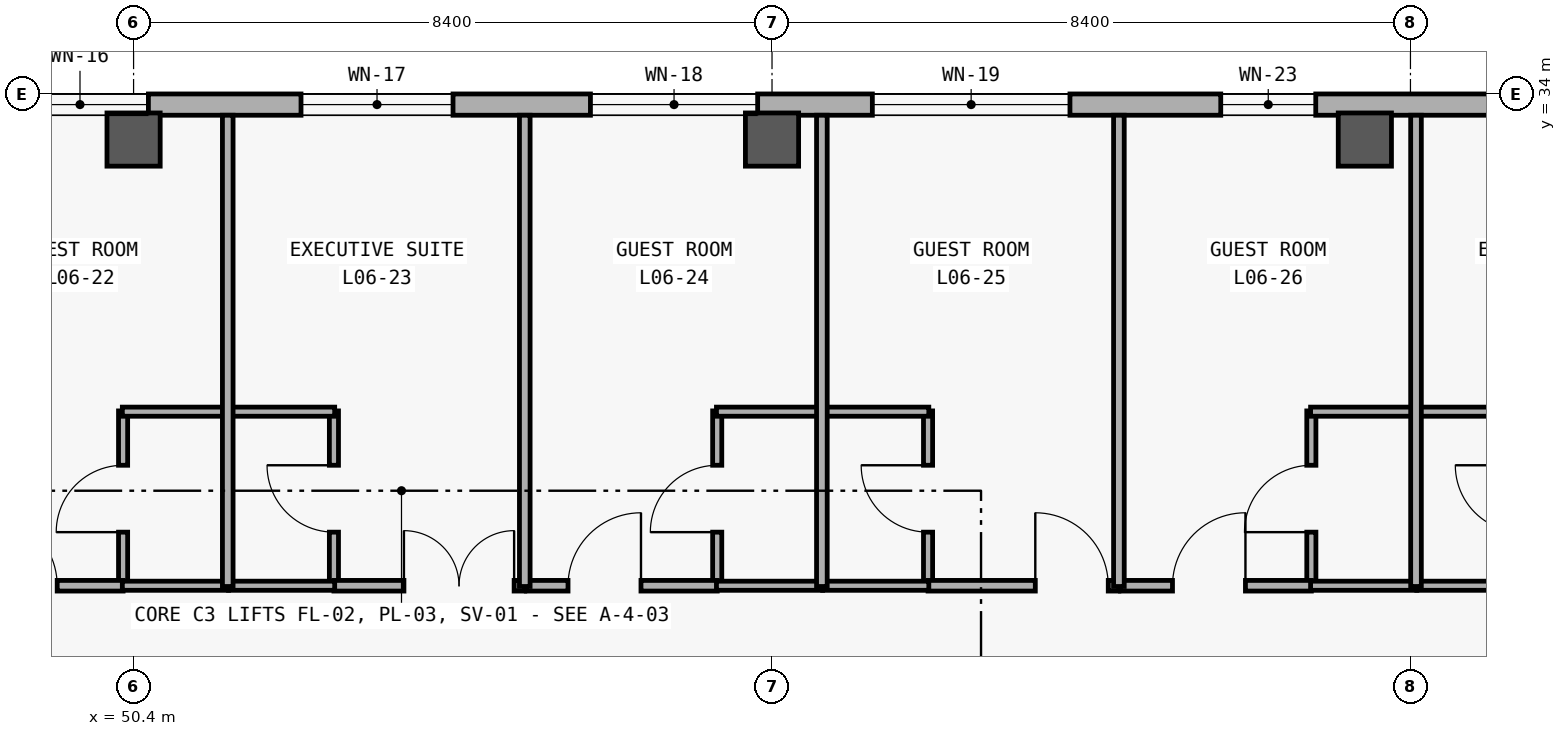
"""IFC4 building model, lengths in metres.
Left out: names, types, materials, properties, quantities, classifications, styles, units other than length and angle.
Written with IfcOpenShell. Run it as: python <this file> out.ifc"""

import sys

from ifc_helpers import new_model, si_unit, direction, frame, frame_2d, origin, origin_2d, place, context, subcontext, project, spatial, rectangle, extrude, element, fill, save


model = new_model("IFC4")
c1 = context("Model", 3, precision=1e-05, world=origin(), true_north=direction((0.0, 1.0)))
c2 = subcontext(c1, "Body", "Model", "MODEL_VIEW")
j1 = project(units=[si_unit("LENGTHUNIT", "METRE"), si_unit("PLANEANGLEUNIT", "RADIAN")], contexts=[c1])
p1 = place(None, origin())
s1 = spatial("IfcSite", under=j1, at=p1, CompositionType="ELEMENT")
p2 = place(p1, origin())
s2 = spatial("IfcBuilding", under=s1, at=p2, CompositionType="ELEMENT")
p3 = place(p2, frame((0.0, 0.0, 26.4)))
s3 = spatial("IfcBuildingStorey", under=s2, at=p3, CompositionType="ELEMENT", Elevation=26.4)
for number, where, z_axis, x_axis in (
    (1, (50.4, 33.4, 0.0), (0.0, 0.0, 1.0), (1.0, 0.0, 0.0)),
    (2, (58.8, 33.4, 0.0), (0.0, 0.0, 1.0), (1.0, 0.0, 0.0)),
    (3, (66.6, 33.4, 0.0), (0.0, 0.0, 1.0), (1.0, 0.0, 0.0)),
):
    element("IfcColumn", number, at=place(p3, frame(where, z_axis=z_axis, x_axis=x_axis)), inside=s3, PredefinedType="COLUMN", context=c2, shape_type="SweptSolid", body=[
        extrude(rectangle(XDim=0.7, YDim=0.7, at=origin_2d()), origin(), (0.0, 0.0, 1.0), 3.6),
    ])
p4 = place(p3, frame((8.68, 33.86, 0.0), z_axis=(0.0, 0.0, 1.0), x_axis=(1.0, 0.0, 0.0)))
e4 = element("IfcWall", 4, at=p4, inside=s3, PredefinedType="SOLIDWALL", context=c2, shape_type="SweptSolid", body=[
    extrude(rectangle(XDim=66.64, YDim=0.28, at=frame_2d((33.32, 0.0))), origin(), (0.0, 0.0, 1.0), 3.32),
])
p5 = place(p4, frame((4.68, 0.0, 0.85)))
e5 = element("IfcOpeningElement", 5, at=p5, cuts=e4, PredefinedType="OPENING", context=c2, shape_type="SweptSolid", body=[
    extrude(rectangle(XDim=2.48, YDim=2.0, at=frame_2d((1.24, 1.0))), frame((0.0, 0.15, 0.0), z_axis=(0.0, -1.0, 0.0), x_axis=(1.0, 0.0, 0.0)), (0.0, 0.0, 1.0), 0.3),
])
p6 = place(p4, frame((12.829, 0.0, 0.85)))
e6 = element("IfcOpeningElement", 6, at=p6, cuts=e4, PredefinedType="OPENING", context=c2, shape_type="SweptSolid", body=[
    extrude(rectangle(XDim=1.65, YDim=1.75, at=frame_2d((0.825, 0.875))), frame((0.0, 0.15, 0.0), z_axis=(0.0, -1.0, 0.0), x_axis=(1.0, 0.0, 0.0)), (0.0, 0.0, 1.0), 0.3),
])
p7 = place(p4, frame((16.588, 0.0, 0.85)))
e7 = element("IfcOpeningElement", 7, at=p7, cuts=e4, PredefinedType="OPENING", context=c2, shape_type="SweptSolid", body=[
    extrude(rectangle(XDim=1.95, YDim=1.75, at=frame_2d((0.975, 0.875))), frame((0.0, 0.15, 0.0), z_axis=(0.0, -1.0, 0.0), x_axis=(1.0, 0.0, 0.0)), (0.0, 0.0, 1.0), 0.3),
])
p8 = place(p4, frame((20.347, 0.0, 0.85)))
e8 = element("IfcOpeningElement", 8, at=p8, cuts=e4, PredefinedType="OPENING", context=c2, shape_type="SweptSolid", body=[
    extrude(rectangle(XDim=2.25, YDim=1.75, at=frame_2d((1.125, 0.875))), frame((0.0, 0.15, 0.0), z_axis=(0.0, -1.0, 0.0), x_axis=(1.0, 0.0, 0.0)), (0.0, 0.0, 1.0), 0.3),
])
p9 = place(p4, frame((24.105, 0.0, 0.85)))
e9 = element("IfcOpeningElement", 9, at=p9, cuts=e4, PredefinedType="OPENING", context=c2, shape_type="SweptSolid", body=[
    extrude(rectangle(XDim=2.55, YDim=1.8, at=frame_2d((1.275, 0.9))), frame((0.0, 0.15, 0.0), z_axis=(0.0, -1.0, 0.0), x_axis=(1.0, 0.0, 0.0)), (0.0, 0.0, 1.0), 0.3),
])
p10 = place(p4, frame((27.864, 0.0, 0.85)))
e10 = element("IfcOpeningElement", 10, at=p10, cuts=e4, PredefinedType="OPENING", context=c2, shape_type="SweptSolid", body=[
    extrude(rectangle(XDim=2.85, YDim=1.85, at=frame_2d((1.425, 0.925))), frame((0.0, 0.15, 0.0), z_axis=(0.0, -1.0, 0.0), x_axis=(1.0, 0.0, 0.0)), (0.0, 0.0, 1.0), 0.3),
])
p11 = place(p4, frame((32.497, 0.0, 0.85)))
e11 = element("IfcOpeningElement", 11, at=p11, cuts=e4, PredefinedType="OPENING", context=c2, shape_type="SweptSolid", body=[
    extrude(rectangle(XDim=1.4, YDim=1.6, at=frame_2d((0.7, 0.8))), frame((0.0, 0.15, 0.0), z_axis=(0.0, -1.0, 0.0), x_axis=(1.0, 0.0, 0.0)), (0.0, 0.0, 1.0), 0.3),
])
p12 = place(p4, frame((36.306, 0.0, 0.85)))
e12 = element("IfcOpeningElement", 12, at=p12, cuts=e4, PredefinedType="OPENING", context=c2, shape_type="SweptSolid", body=[
    extrude(rectangle(XDim=1.6, YDim=1.6, at=frame_2d((0.8, 0.8))), frame((0.0, 0.15, 0.0), z_axis=(0.0, -1.0, 0.0), x_axis=(1.0, 0.0, 0.0)), (0.0, 0.0, 1.0), 0.3),
])
p13 = place(p4, frame((40.115, 0.0, 0.85)))
e13 = element("IfcOpeningElement", 13, at=p13, cuts=e4, PredefinedType="OPENING", context=c2, shape_type="SweptSolid", body=[
    extrude(rectangle(XDim=1.8, YDim=1.6, at=frame_2d((0.9, 0.8))), frame((0.0, 0.15, 0.0), z_axis=(0.0, -1.0, 0.0), x_axis=(1.0, 0.0, 0.0)), (0.0, 0.0, 1.0), 0.3),
])
p14 = place(p4, frame((43.923, 0.0, 0.85)))
e14 = element("IfcOpeningElement", 14, at=p14, cuts=e4, PredefinedType="OPENING", context=c2, shape_type="SweptSolid", body=[
    extrude(rectangle(XDim=2.0, YDim=1.65, at=frame_2d((1.0, 0.825))), frame((0.0, 0.15, 0.0), z_axis=(0.0, -1.0, 0.0), x_axis=(1.0, 0.0, 0.0)), (0.0, 0.0, 1.0), 0.3),
])
p15 = place(p4, frame((47.731, 0.0, 0.85)))
e15 = element("IfcOpeningElement", 15, at=p15, cuts=e4, PredefinedType="OPENING", context=c2, shape_type="SweptSolid", body=[
    extrude(rectangle(XDim=2.2, YDim=1.65, at=frame_2d((1.1, 0.825))), frame((0.0, 0.15, 0.0), z_axis=(0.0, -1.0, 0.0), x_axis=(1.0, 0.0, 0.0)), (0.0, 0.0, 1.0), 0.3),
])
p16 = place(p4, frame((51.44, 0.0, 0.85)))
e16 = element("IfcOpeningElement", 16, at=p16, cuts=e4, PredefinedType="OPENING", context=c2, shape_type="SweptSolid", body=[
    extrude(rectangle(XDim=2.6, YDim=2.2, at=frame_2d((1.3, 1.1))), frame((0.0, 0.15, 0.0), z_axis=(0.0, -1.0, 0.0), x_axis=(1.0, 0.0, 0.0)), (0.0, 0.0, 1.0), 0.3),
])
p17 = place(p4, frame((56.024, 0.0, 0.85)))
e17 = element("IfcOpeningElement", 17, at=p17, cuts=e4, PredefinedType="OPENING", context=c2, shape_type="SweptSolid", body=[
    extrude(rectangle(XDim=1.25, YDim=1.45, at=frame_2d((0.625, 0.725))), frame((0.0, 0.15, 0.0), z_axis=(0.0, -1.0, 0.0), x_axis=(1.0, 0.0, 0.0)), (0.0, 0.0, 1.0), 0.3),
])
p18 = place(p4, frame((59.882, 0.0, 0.85)))
e18 = element("IfcOpeningElement", 18, at=p18, cuts=e4, PredefinedType="OPENING", context=c2, shape_type="SweptSolid", body=[
    extrude(rectangle(XDim=1.35, YDim=1.55, at=frame_2d((0.675, 0.775))), frame((0.0, 0.15, 0.0), z_axis=(0.0, -1.0, 0.0), x_axis=(1.0, 0.0, 0.0)), (0.0, 0.0, 1.0), 0.3),
])
p19 = place(p4, frame((63.74, 0.0, 0.85)))
e19 = element("IfcOpeningElement", 19, at=p19, cuts=e4, PredefinedType="OPENING", context=c2, shape_type="SweptSolid", body=[
    extrude(rectangle(XDim=1.45, YDim=1.65, at=frame_2d((0.725, 0.825))), frame((0.0, 0.15, 0.0), z_axis=(0.0, -1.0, 0.0), x_axis=(1.0, 0.0, 0.0)), (0.0, 0.0, 1.0), 0.3),
])
p20 = place(p3, frame((50.262, 27.52, 0.0), z_axis=(0.0, 0.0, 1.0), x_axis=(0.0, 1.0, 0.0)))
e20 = element("IfcWall", 20, at=p20, inside=s3, PredefinedType="PARTITIONING", context=c2, shape_type="SweptSolid", body=[
    extrude(rectangle(XDim=2.31, YDim=0.12, at=frame_2d((1.155, 0.0))), origin(), (0.0, 0.0, 1.0), 2.48),
])
p21 = place(p20, frame((0.715, 0.0, 0.0)))
e21 = element("IfcOpeningElement", 21, at=p21, cuts=e20, PredefinedType="OPENING", context=c2, shape_type="SweptSolid", body=[
    extrude(rectangle(XDim=0.88, YDim=2.15, at=frame_2d((0.44, 1.075))), frame((0.0, 0.07, 0.0), z_axis=(0.0, -1.0, 0.0), x_axis=(1.0, 0.0, 0.0)), (0.0, 0.0, 1.0), 0.14),
])
p22 = place(p3, frame((53.036, 27.52, 0.0), z_axis=(0.0, 0.0, 1.0), x_axis=(0.0, 1.0, 0.0)))
e22 = element("IfcWall", 22, at=p22, inside=s3, PredefinedType="PARTITIONING", context=c2, shape_type="SweptSolid", body=[
    extrude(rectangle(XDim=2.31, YDim=0.12, at=frame_2d((1.155, 0.0))), origin(), (0.0, 0.0, 1.0), 2.48),
])
p23 = place(p22, frame((0.715, 0.0, 0.0)))
e23 = element("IfcOpeningElement", 23, at=p23, cuts=e22, PredefinedType="OPENING", context=c2, shape_type="SweptSolid", body=[
    extrude(rectangle(XDim=0.88, YDim=2.15, at=frame_2d((0.44, 1.075))), frame((0.0, 0.07, 0.0), z_axis=(0.0, -1.0, 0.0), x_axis=(1.0, 0.0, 0.0)), (0.0, 0.0, 1.0), 0.14),
])
p24 = place(p3, frame((58.079, 27.52, 0.0), z_axis=(0.0, 0.0, 1.0), x_axis=(0.0, 1.0, 0.0)))
e24 = element("IfcWall", 24, at=p24, inside=s3, PredefinedType="PARTITIONING", context=c2, shape_type="SweptSolid", body=[
    extrude(rectangle(XDim=2.31, YDim=0.12, at=frame_2d((1.155, 0.0))), origin(), (0.0, 0.0, 1.0), 2.48),
])
p25 = place(p24, frame((0.715, 0.0, 0.0)))
e25 = element("IfcOpeningElement", 25, at=p25, cuts=e24, PredefinedType="OPENING", context=c2, shape_type="SweptSolid", body=[
    extrude(rectangle(XDim=0.88, YDim=2.15, at=frame_2d((0.44, 1.075))), frame((0.0, 0.07, 0.0), z_axis=(0.0, -1.0, 0.0), x_axis=(1.0, 0.0, 0.0)), (0.0, 0.0, 1.0), 0.14),
])
p26 = place(p3, frame((60.853, 27.52, 0.0), z_axis=(0.0, 0.0, 1.0), x_axis=(0.0, 1.0, 0.0)))
e26 = element("IfcWall", 26, at=p26, inside=s3, PredefinedType="PARTITIONING", context=c2, shape_type="SweptSolid", body=[
    extrude(rectangle(XDim=2.31, YDim=0.12, at=frame_2d((1.155, 0.0))), origin(), (0.0, 0.0, 1.0), 2.48),
])
p27 = place(p26, frame((0.715, 0.0, 0.0)))
e27 = element("IfcOpeningElement", 27, at=p27, cuts=e26, PredefinedType="OPENING", context=c2, shape_type="SweptSolid", body=[
    extrude(rectangle(XDim=0.88, YDim=2.15, at=frame_2d((0.44, 1.075))), frame((0.0, 0.07, 0.0), z_axis=(0.0, -1.0, 0.0), x_axis=(1.0, 0.0, 0.0)), (0.0, 0.0, 1.0), 0.14),
])
p28 = place(p3, frame((65.896, 27.52, 0.0), z_axis=(0.0, 0.0, 1.0), x_axis=(0.0, 1.0, 0.0)))
e28 = element("IfcWall", 28, at=p28, inside=s3, PredefinedType="PARTITIONING", context=c2, shape_type="SweptSolid", body=[
    extrude(rectangle(XDim=2.31, YDim=0.12, at=frame_2d((1.155, 0.0))), origin(), (0.0, 0.0, 1.0), 2.48),
])
p29 = place(p28, frame((0.715, 0.0, 0.0)))
e29 = element("IfcOpeningElement", 29, at=p29, cuts=e28, PredefinedType="OPENING", context=c2, shape_type="SweptSolid", body=[
    extrude(rectangle(XDim=0.88, YDim=2.15, at=frame_2d((0.44, 1.075))), frame((0.0, 0.07, 0.0), z_axis=(0.0, -1.0, 0.0), x_axis=(1.0, 0.0, 0.0)), (0.0, 0.0, 1.0), 0.14),
])
p30 = place(p3, frame((47.75, 27.53, 0.0), z_axis=(0.0, 0.0, 1.0), x_axis=(1.0, 0.0, 0.0)))
e30 = element("IfcWall", 30, at=p30, inside=s3, PredefinedType="PARTITIONING", context=c2, shape_type="SweptSolid", body=[
    extrude(rectangle(XDim=2.512, YDim=0.14, at=frame_2d((1.256, 0.0))), origin(), (0.0, 0.0, 1.0), 2.48),
])
p31 = place(p30, frame((0.685, 0.0, 0.0)))
e31 = element("IfcOpeningElement", 31, at=p31, cuts=e30, PredefinedType="OPENING", context=c2, shape_type="SweptSolid", body=[
    extrude(rectangle(XDim=0.96, YDim=2.25, at=frame_2d((0.48, 1.125))), frame((0.0, 0.08, 0.0), z_axis=(0.0, -1.0, 0.0), x_axis=(1.0, 0.0, 0.0)), (0.0, 0.0, 1.0), 0.16),
])
p32 = place(p3, frame((53.036, 27.53, 0.0), z_axis=(0.0, 0.0, 1.0), x_axis=(1.0, 0.0, 0.0)))
e32 = element("IfcWall", 32, at=p32, inside=s3, PredefinedType="PARTITIONING", context=c2, shape_type="SweptSolid", body=[
    extrude(rectangle(XDim=2.511, YDim=0.14, at=frame_2d((1.256, 0.0))), origin(), (0.0, 0.0, 1.0), 2.48),
])
p33 = place(p32, frame((0.921, 0.0, 0.0)))
e33 = element("IfcOpeningElement", 33, at=p33, cuts=e32, PredefinedType="OPENING", context=c2, shape_type="SweptSolid", body=[
    extrude(rectangle(XDim=1.45, YDim=2.3, at=frame_2d((0.725, 1.15))), frame((0.0, 0.08, 0.0), z_axis=(0.0, -1.0, 0.0), x_axis=(1.0, 0.0, 0.0)), (0.0, 0.0, 1.0), 0.16),
])
p34 = place(p3, frame((55.567, 27.53, 0.0), z_axis=(0.0, 0.0, 1.0), x_axis=(1.0, 0.0, 0.0)))
e34 = element("IfcWall", 34, at=p34, inside=s3, PredefinedType="PARTITIONING", context=c2, shape_type="SweptSolid", body=[
    extrude(rectangle(XDim=2.512, YDim=0.14, at=frame_2d((1.256, 0.0))), origin(), (0.0, 0.0, 1.0), 2.48),
])
p35 = place(p34, frame((0.549, 0.0, 0.0)))
e35 = element("IfcOpeningElement", 35, at=p35, cuts=e34, PredefinedType="OPENING", context=c2, shape_type="SweptSolid", body=[
    extrude(rectangle(XDim=0.96, YDim=2.25, at=frame_2d((0.48, 1.125))), frame((0.0, 0.08, 0.0), z_axis=(0.0, -1.0, 0.0), x_axis=(1.0, 0.0, 0.0)), (0.0, 0.0, 1.0), 0.16),
])
p36 = place(p3, frame((60.853, 27.53, 0.0), z_axis=(0.0, 0.0, 1.0), x_axis=(1.0, 0.0, 0.0)))
e36 = element("IfcWall", 36, at=p36, inside=s3, PredefinedType="PARTITIONING", context=c2, shape_type="SweptSolid", body=[
    extrude(rectangle(XDim=2.511, YDim=0.14, at=frame_2d((1.255, 0.0))), origin(), (0.0, 0.0, 1.0), 2.48),
])
p37 = place(p36, frame((1.411, 0.0, 0.0)))
e37 = element("IfcOpeningElement", 37, at=p37, cuts=e36, PredefinedType="OPENING", context=c2, shape_type="SweptSolid", body=[
    extrude(rectangle(XDim=0.96, YDim=2.25, at=frame_2d((0.48, 1.125))), frame((0.0, 0.08, 0.0), z_axis=(0.0, -1.0, 0.0), x_axis=(1.0, 0.0, 0.0)), (0.0, 0.0, 1.0), 0.16),
])
p38 = place(p3, frame((63.384, 27.53, 0.0), z_axis=(0.0, 0.0, 1.0), x_axis=(1.0, 0.0, 0.0)))
e38 = element("IfcWall", 38, at=p38, inside=s3, PredefinedType="PARTITIONING", context=c2, shape_type="SweptSolid", body=[
    extrude(rectangle(XDim=2.512, YDim=0.14, at=frame_2d((1.256, 0.0))), origin(), (0.0, 0.0, 1.0), 2.48),
])
p39 = place(p38, frame((0.685, 0.0, 0.0)))
e39 = element("IfcOpeningElement", 39, at=p39, cuts=e38, PredefinedType="OPENING", context=c2, shape_type="SweptSolid", body=[
    extrude(rectangle(XDim=0.96, YDim=2.25, at=frame_2d((0.48, 1.125))), frame((0.0, 0.08, 0.0), z_axis=(0.0, -1.0, 0.0), x_axis=(1.0, 0.0, 0.0)), (0.0, 0.0, 1.0), 0.16),
])
for number, where, z_axis, x_axis in (
    (40, (50.252, 27.53, 0.0), (0.0, 0.0, 1.0), (1.0, 0.0, 0.0)),
    (41, (50.252, 29.82, 0.0), (0.0, 0.0, 1.0), (1.0, 0.0, 0.0)),
    (42, (51.649, 27.53, 0.0), (0.0, 0.0, 1.0), (1.0, 0.0, 0.0)),
    (43, (51.649, 29.82, 0.0), (0.0, 0.0, 1.0), (1.0, 0.0, 0.0)),
    (44, (58.069, 27.53, 0.0), (0.0, 0.0, 1.0), (1.0, 0.0, 0.0)),
    (45, (58.069, 29.82, 0.0), (0.0, 0.0, 1.0), (1.0, 0.0, 0.0)),
    (46, (59.466, 27.53, 0.0), (0.0, 0.0, 1.0), (1.0, 0.0, 0.0)),
    (47, (59.466, 29.82, 0.0), (0.0, 0.0, 1.0), (1.0, 0.0, 0.0)),
    (48, (65.886, 27.53, 0.0), (0.0, 0.0, 1.0), (1.0, 0.0, 0.0)),
    (49, (65.886, 29.82, 0.0), (0.0, 0.0, 1.0), (1.0, 0.0, 0.0)),
    (50, (67.283, 27.53, 0.0), (0.0, 0.0, 1.0), (1.0, 0.0, 0.0)),
    (51, (67.283, 29.82, 0.0), (0.0, 0.0, 1.0), (1.0, 0.0, 0.0)),
):
    element("IfcWall", number, at=place(p3, frame(where, z_axis=z_axis, x_axis=x_axis)), inside=s3, PredefinedType="PARTITIONING", context=c2, shape_type="SweptSolid", body=[
        extrude(rectangle(XDim=1.397, YDim=0.12, at=frame_2d((0.698, 0.0))), origin(), (0.0, 0.0, 1.0), 2.48),
    ])
for number, where, z_axis, x_axis in (
    (52, (51.639, 27.52, 0.0), (0.0, 0.0, 1.0), (0.0, 1.0, 0.0)),
    (53, (55.547, 27.52, 0.0), (0.0, 0.0, 1.0), (0.0, 1.0, 0.0)),
    (54, (59.456, 27.52, 0.0), (0.0, 0.0, 1.0), (0.0, 1.0, 0.0)),
    (55, (63.364, 27.52, 0.0), (0.0, 0.0, 1.0), (0.0, 1.0, 0.0)),
    (56, (67.273, 27.52, 0.0), (0.0, 0.0, 1.0), (0.0, 1.0, 0.0)),
):
    element("IfcWall", number, at=place(p3, frame(where, z_axis=z_axis, x_axis=x_axis)), inside=s3, PredefinedType="PARTITIONING", context=c2, shape_type="SweptSolid", body=[
        extrude(rectangle(XDim=6.2, YDim=0.14, at=frame_2d((3.1, 0.0))), origin(), (0.0, 0.0, 1.0), 2.48),
    ])
p40 = place(p13, origin())
e57 = element("IfcWindow", 57, at=p40, inside=s3, PartitioningType="SINGLE_PANEL", PredefinedType="WINDOW", context=c2, shape_type="SweptSolid", body=[
    extrude(rectangle(XDim=1.8, YDim=1.6, at=frame_2d((0.9, 0.8))), frame((0.0, 0.03, 0.0), z_axis=(0.0, -1.0, 0.0), x_axis=(1.0, 0.0, 0.0)), (0.0, 0.0, 1.0), 0.06),
])
fill(e13, e57)
p41 = place(p14, origin())
e58 = element("IfcWindow", 58, at=p41, inside=s3, PartitioningType="SINGLE_PANEL", PredefinedType="WINDOW", context=c2, shape_type="SweptSolid", body=[
    extrude(rectangle(XDim=2.0, YDim=1.65, at=frame_2d((1.0, 0.825))), frame((0.0, 0.03, 0.0), z_axis=(0.0, -1.0, 0.0), x_axis=(1.0, 0.0, 0.0)), (0.0, 0.0, 1.0), 0.06),
])
fill(e14, e58)
p42 = place(p15, origin())
e59 = element("IfcWindow", 59, at=p42, inside=s3, PartitioningType="SINGLE_PANEL", PredefinedType="WINDOW", context=c2, shape_type="SweptSolid", body=[
    extrude(rectangle(XDim=2.2, YDim=1.65, at=frame_2d((1.1, 0.825))), frame((0.0, 0.03, 0.0), z_axis=(0.0, -1.0, 0.0), x_axis=(1.0, 0.0, 0.0)), (0.0, 0.0, 1.0), 0.06),
])
fill(e15, e59)
p43 = place(p16, origin())
e60 = element("IfcWindow", 60, at=p43, inside=s3, PartitioningType="SINGLE_PANEL", PredefinedType="WINDOW", context=c2, shape_type="SweptSolid", body=[
    extrude(rectangle(XDim=2.6, YDim=2.2, at=frame_2d((1.3, 1.1))), frame((0.0, 0.03, 0.0), z_axis=(0.0, -1.0, 0.0), x_axis=(1.0, 0.0, 0.0)), (0.0, 0.0, 1.0), 0.06),
])
fill(e16, e60)
p44 = place(p17, origin())
e61 = element("IfcWindow", 61, at=p44, inside=s3, PartitioningType="SINGLE_PANEL", PredefinedType="WINDOW", context=c2, shape_type="SweptSolid", body=[
    extrude(rectangle(XDim=1.25, YDim=1.45, at=frame_2d((0.625, 0.725))), frame((0.0, 0.03, 0.0), z_axis=(0.0, -1.0, 0.0), x_axis=(1.0, 0.0, 0.0)), (0.0, 0.0, 1.0), 0.06),
])
fill(e17, e61)
p45 = place(p21, origin())
e62 = element("IfcDoor", 62, at=p45, inside=s3, OperationType="SINGLE_SWING_LEFT", PredefinedType="DOOR", context=c2, shape_type="SweptSolid", body=[
    extrude(rectangle(XDim=0.88, YDim=2.15, at=frame_2d((0.44, 1.075))), frame((0.0, 0.025, 0.0), z_axis=(0.0, -1.0, 0.0), x_axis=(1.0, 0.0, 0.0)), (0.0, 0.0, 1.0), 0.05),
])
fill(e21, e62)
p46 = place(p23, origin())
e63 = element("IfcDoor", 63, at=p46, inside=s3, OperationType="SINGLE_SWING_RIGHT", PredefinedType="DOOR", context=c2, shape_type="SweptSolid", body=[
    extrude(rectangle(XDim=0.88, YDim=2.15, at=frame_2d((0.44, 1.075))), frame((0.0, 0.025, 0.0), z_axis=(0.0, -1.0, 0.0), x_axis=(1.0, 0.0, 0.0)), (0.0, 0.0, 1.0), 0.05),
])
fill(e23, e63)
p47 = place(p25, origin())
e64 = element("IfcDoor", 64, at=p47, inside=s3, OperationType="SINGLE_SWING_LEFT", PredefinedType="DOOR", context=c2, shape_type="SweptSolid", body=[
    extrude(rectangle(XDim=0.88, YDim=2.15, at=frame_2d((0.44, 1.075))), frame((0.0, 0.025, 0.0), z_axis=(0.0, -1.0, 0.0), x_axis=(1.0, 0.0, 0.0)), (0.0, 0.0, 1.0), 0.05),
])
fill(e25, e64)
p48 = place(p27, origin())
e65 = element("IfcDoor", 65, at=p48, inside=s3, OperationType="SINGLE_SWING_RIGHT", PredefinedType="DOOR", context=c2, shape_type="SweptSolid", body=[
    extrude(rectangle(XDim=0.88, YDim=2.15, at=frame_2d((0.44, 1.075))), frame((0.0, 0.025, 0.0), z_axis=(0.0, -1.0, 0.0), x_axis=(1.0, 0.0, 0.0)), (0.0, 0.0, 1.0), 0.05),
])
fill(e27, e65)
p49 = place(p29, origin())
e66 = element("IfcDoor", 66, at=p49, inside=s3, OperationType="SINGLE_SWING_LEFT", PredefinedType="DOOR", context=c2, shape_type="SweptSolid", body=[
    extrude(rectangle(XDim=0.88, YDim=2.15, at=frame_2d((0.44, 1.075))), frame((0.0, 0.025, 0.0), z_axis=(0.0, -1.0, 0.0), x_axis=(1.0, 0.0, 0.0)), (0.0, 0.0, 1.0), 0.05),
])
fill(e29, e66)
p50 = place(p31, origin())
e67 = element("IfcDoor", 67, at=p50, inside=s3, OperationType="SINGLE_SWING_LEFT", PredefinedType="DOOR", context=c2, shape_type="SweptSolid", body=[
    extrude(rectangle(XDim=0.96, YDim=2.25, at=frame_2d((0.48, 1.125))), frame((0.0, 0.025, 0.0), z_axis=(0.0, -1.0, 0.0), x_axis=(1.0, 0.0, 0.0)), (0.0, 0.0, 1.0), 0.05),
])
fill(e31, e67)
p51 = place(p33, origin())
e68 = element("IfcDoor", 68, at=p51, inside=s3, OperationType="DOUBLE_DOOR_SINGLE_SWING", PredefinedType="DOOR", context=c2, shape_type="SweptSolid", body=[
    extrude(rectangle(XDim=1.45, YDim=2.3, at=frame_2d((0.725, 1.15))), frame((0.0, 0.025, 0.0), z_axis=(0.0, -1.0, 0.0), x_axis=(1.0, 0.0, 0.0)), (0.0, 0.0, 1.0), 0.05),
])
fill(e33, e68)
p52 = place(p35, origin())
e69 = element("IfcDoor", 69, at=p52, inside=s3, OperationType="SINGLE_SWING_RIGHT", PredefinedType="DOOR", context=c2, shape_type="SweptSolid", body=[
    extrude(rectangle(XDim=0.96, YDim=2.25, at=frame_2d((0.48, 1.125))), frame((0.0, 0.025, 0.0), z_axis=(0.0, -1.0, 0.0), x_axis=(1.0, 0.0, 0.0)), (0.0, 0.0, 1.0), 0.05),
])
fill(e35, e69)
p53 = place(p37, origin())
e70 = element("IfcDoor", 70, at=p53, inside=s3, OperationType="SINGLE_SWING_LEFT", PredefinedType="DOOR", context=c2, shape_type="SweptSolid", body=[
    extrude(rectangle(XDim=0.96, YDim=2.25, at=frame_2d((0.48, 1.125))), frame((0.0, 0.025, 0.0), z_axis=(0.0, -1.0, 0.0), x_axis=(1.0, 0.0, 0.0)), (0.0, 0.0, 1.0), 0.05),
])
fill(e37, e70)
p54 = place(p39, origin())
e71 = element("IfcDoor", 71, at=p54, inside=s3, OperationType="SINGLE_SWING_RIGHT", PredefinedType="DOOR", context=c2, shape_type="SweptSolid", body=[
    extrude(rectangle(XDim=0.96, YDim=2.25, at=frame_2d((0.48, 1.125))), frame((0.0, 0.025, 0.0), z_axis=(0.0, -1.0, 0.0), x_axis=(1.0, 0.0, 0.0)), (0.0, 0.0, 1.0), 0.05),
])
fill(e39, e71)
save(model, sys.argv[1])
